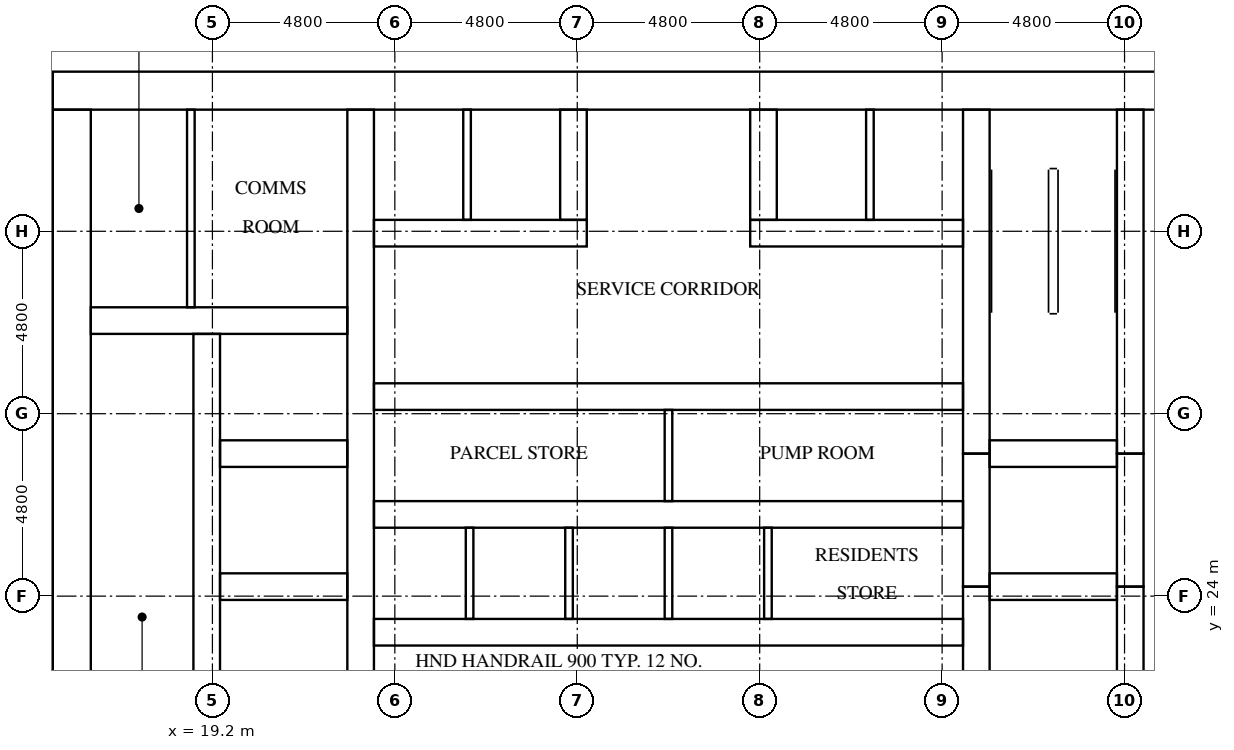
"""IFC4 building model, lengths in metres.
Left out: names, types, materials, properties, quantities, classifications, styles, units other than length and angle.
Written with IfcOpenShell. Run it as: python <this file> out.ifc"""

import sys

from ifc_helpers import new_model, si_unit, direction, frame, frame_2d, origin, place, context, subcontext, project, spatial, rectangle, extrude, element, fill, save


model = new_model("IFC4")
c1 = context("Model", 3, precision=1e-05, world=origin(), true_north=direction((0.0, 1.0)))
c2 = subcontext(c1, "Body", "Model", "MODEL_VIEW")
j1 = project(units=[si_unit("LENGTHUNIT", "METRE"), si_unit("PLANEANGLEUNIT", "RADIAN")], contexts=[c1])
p1 = place(None, origin())
s1 = spatial("IfcSite", under=j1, at=p1, CompositionType="ELEMENT")
p2 = place(p1, origin())
s2 = spatial("IfcBuilding", under=s1, at=p2, CompositionType="ELEMENT")
p3 = place(p2, frame((0.0, 0.0, 15.0)))
s3 = spatial("IfcBuildingStorey", under=s2, at=p3, CompositionType="ELEMENT", Elevation=15.0)
p4 = place(p3, frame((15.0, 37.3, 0.0), z_axis=(0.0, 0.0, 1.0), x_axis=(1.0, 0.0, 0.0)))
e1 = element("IfcWall", 1, at=p4, inside=s3, PredefinedType="SHEAR", context=c2, shape_type="SweptSolid", body=[
    extrude(rectangle(XDim=32.4, YDim=1.0, at=frame_2d((16.2, 0.0))), origin(), (0.0, 0.0, 1.0), 4.2),
])
p5 = place(p4, frame((15.3, 0.0, 0.0)))
e2 = element("IfcOpeningElement", 2, at=p5, cuts=e1, PredefinedType="OPENING", context=c2, shape_type="SweptSolid", body=[
    extrude(rectangle(XDim=1.8, YDim=2.1, at=frame_2d((0.9, 1.05))), frame((0.0, 0.51, 0.0), z_axis=(0.0, -1.0, 0.0), x_axis=(1.0, 0.0, 0.0)), (0.0, 0.0, 1.0), 1.02),
])
p6 = place(p4, frame((1.766, 0.0, 0.0)))
e3 = element("IfcOpeningElement", 3, at=p6, cuts=e1, PredefinedType="OPENING", context=c2, shape_type="SweptSolid", body=[
    extrude(rectangle(XDim=1.0, YDim=2.1, at=frame_2d((0.5, 1.05))), frame((0.0, 0.51, 0.0), z_axis=(0.0, -1.0, 0.0), x_axis=(1.0, 0.0, 0.0)), (0.0, 0.0, 1.0), 1.02),
])
p7 = place(p4, frame((5.241, 0.0, 0.0)))
e4 = element("IfcOpeningElement", 4, at=p7, cuts=e1, PredefinedType="OPENING", context=c2, shape_type="SweptSolid", body=[
    extrude(rectangle(XDim=1.0, YDim=2.1, at=frame_2d((0.5, 1.05))), frame((0.0, 0.51, 0.0), z_axis=(0.0, -1.0, 0.0), x_axis=(1.0, 0.0, 0.0)), (0.0, 0.0, 1.0), 1.02),
])
p8 = place(p3, frame((15.5, 16.0, 0.0), z_axis=(0.0, 0.0, 1.0), x_axis=(0.0, 1.0, 0.0)))
e5 = element("IfcWall", 5, at=p8, inside=s3, PredefinedType="SHEAR", context=c2, shape_type="SweptSolid", body=[
    extrude(rectangle(XDim=20.8, YDim=1.0, at=frame_2d((10.4, 0.0))), origin(), (0.0, 0.0, 1.0), 4.2),
])
p9 = place(p8, frame((4.76, 0.0, 0.0)))
e6 = element("IfcOpeningElement", 6, at=p9, cuts=e5, PredefinedType="OPENING", context=c2, shape_type="SweptSolid", body=[
    extrude(rectangle(XDim=1.2, YDim=2.1, at=frame_2d((0.6, 1.05))), frame((0.0, 0.51, 0.0), z_axis=(0.0, -1.0, 0.0), x_axis=(1.0, 0.0, 0.0)), (0.0, 0.0, 1.0), 1.02),
])
p10 = place(p3, frame((19.05, 16.0, 0.0), z_axis=(0.0, 0.0, 1.0), x_axis=(0.0, 1.0, 0.0)))
e7 = element("IfcWall", 7, at=p10, inside=s3, PredefinedType="SHEAR", context=c2, shape_type="SweptSolid", body=[
    extrude(rectangle(XDim=14.9, YDim=0.7, at=frame_2d((7.45, 0.0))), origin(), (0.0, 0.0, 1.0), 4.2),
])
p11 = place(p10, frame((9.45, 0.0, 0.0)))
e8 = element("IfcOpeningElement", 8, at=p11, cuts=e7, PredefinedType="OPENING", context=c2, shape_type="SweptSolid", body=[
    extrude(rectangle(XDim=1.1, YDim=2.1, at=frame_2d((0.55, 1.05))), frame((0.0, 0.36, 0.0), z_axis=(0.0, -1.0, 0.0), x_axis=(1.0, 0.0, 0.0)), (0.0, 0.0, 1.0), 0.72),
])
p12 = place(p10, frame((12.95, 0.0, 0.0)))
e9 = element("IfcOpeningElement", 9, at=p12, cuts=e7, PredefinedType="OPENING", context=c2, shape_type="SweptSolid", body=[
    extrude(rectangle(XDim=1.1, YDim=2.1, at=frame_2d((0.55, 1.05))), frame((0.0, 0.36, 0.0), z_axis=(0.0, -1.0, 0.0), x_axis=(1.0, 0.0, 0.0)), (0.0, 0.0, 1.0), 0.72),
])
p13 = place(p10, frame((0.2, 0.0, 0.0)))
e10 = element("IfcOpeningElement", 10, at=p13, cuts=e7, PredefinedType="OPENING", context=c2, shape_type="SweptSolid", body=[
    extrude(rectangle(XDim=1.2, YDim=2.1, at=frame_2d((0.6, 1.05))), frame((0.0, 0.36, 0.0), z_axis=(0.0, -1.0, 0.0), x_axis=(1.0, 0.0, 0.0)), (0.0, 0.0, 1.0), 0.72),
])
p14 = place(p3, frame((23.1, 16.0, 0.0), z_axis=(0.0, 0.0, 1.0), x_axis=(0.0, 1.0, 0.0)))
e11 = element("IfcWall", 11, at=p14, inside=s3, PredefinedType="SHEAR", context=c2, shape_type="SweptSolid", body=[
    extrude(rectangle(XDim=20.8, YDim=0.7, at=frame_2d((10.4, 0.0))), origin(), (0.0, 0.0, 1.0), 4.2),
])
p15 = place(p3, frame((39.3, 16.0, 0.0), z_axis=(0.0, 0.0, 1.0), x_axis=(0.0, 1.0, 0.0)))
e12 = element("IfcWall", 12, at=p15, inside=s3, PredefinedType="SHEAR", context=c2, shape_type="SweptSolid", body=[
    extrude(rectangle(XDim=8.25, YDim=0.7, at=frame_2d((4.125, 0.0))), origin(), (0.0, 0.0, 1.0), 4.2),
])
p16 = place(p3, frame((39.3, 24.25, 0.0), z_axis=(0.0, 0.0, 1.0), x_axis=(0.0, 1.0, 0.0)))
e13 = element("IfcWall", 13, at=p16, inside=s3, PredefinedType="SHEAR", context=c2, shape_type="SweptSolid", body=[
    extrude(rectangle(XDim=3.5, YDim=0.7, at=frame_2d((1.75, 0.0))), origin(), (0.0, 0.0, 1.0), 4.2),
])
p17 = place(p3, frame((39.3, 27.75, 0.0), z_axis=(0.0, 0.0, 1.0), x_axis=(0.0, 1.0, 0.0)))
e14 = element("IfcWall", 14, at=p17, inside=s3, PredefinedType="SHEAR", context=c2, shape_type="SweptSolid", body=[
    extrude(rectangle(XDim=9.05, YDim=0.7, at=frame_2d((4.525, 0.0))), origin(), (0.0, 0.0, 1.0), 4.2),
])
p18 = place(p3, frame((43.35, 16.0, 0.0), z_axis=(0.0, 0.0, 1.0), x_axis=(0.0, 1.0, 0.0)))
e15 = element("IfcWall", 15, at=p18, inside=s3, PredefinedType="SHEAR", context=c2, shape_type="SweptSolid", body=[
    extrude(rectangle(XDim=8.25, YDim=0.7, at=frame_2d((4.125, 0.0))), origin(), (0.0, 0.0, 1.0), 4.2),
])
p19 = place(p18, frame((0.2, 0.0, 0.0)))
e16 = element("IfcOpeningElement", 16, at=p19, cuts=e15, PredefinedType="OPENING", context=c2, shape_type="SweptSolid", body=[
    extrude(rectangle(XDim=1.2, YDim=2.1, at=frame_2d((0.6, 1.05))), frame((0.0, 0.36, 0.0), z_axis=(0.0, -1.0, 0.0), x_axis=(1.0, 0.0, 0.0)), (0.0, 0.0, 1.0), 0.72),
])
p20 = place(p3, frame((43.35, 24.25, 0.0), z_axis=(0.0, 0.0, 1.0), x_axis=(0.0, 1.0, 0.0)))
e17 = element("IfcWall", 17, at=p20, inside=s3, PredefinedType="SHEAR", context=c2, shape_type="SweptSolid", body=[
    extrude(rectangle(XDim=3.5, YDim=0.7, at=frame_2d((1.75, 0.0))), origin(), (0.0, 0.0, 1.0), 4.2),
])
p21 = place(p20, frame((1.2, 0.0, 0.0)))
e18 = element("IfcOpeningElement", 18, at=p21, cuts=e17, PredefinedType="OPENING", context=c2, shape_type="SweptSolid", body=[
    extrude(rectangle(XDim=1.1, YDim=2.1, at=frame_2d((0.55, 1.05))), frame((0.0, 0.36, 0.0), z_axis=(0.0, -1.0, 0.0), x_axis=(1.0, 0.0, 0.0)), (0.0, 0.0, 1.0), 0.72),
])
p22 = place(p3, frame((43.35, 27.75, 0.0), z_axis=(0.0, 0.0, 1.0), x_axis=(0.0, 1.0, 0.0)))
e19 = element("IfcWall", 19, at=p22, inside=s3, PredefinedType="SHEAR", context=c2, shape_type="SweptSolid", body=[
    extrude(rectangle(XDim=9.05, YDim=0.7, at=frame_2d((4.525, 0.0))), origin(), (0.0, 0.0, 1.0), 4.2),
])
p23 = place(p22, frame((7.65, 0.0, 0.0)))
e20 = element("IfcOpeningElement", 20, at=p23, cuts=e19, PredefinedType="OPENING", context=c2, shape_type="SweptSolid", body=[
    extrude(rectangle(XDim=1.2, YDim=2.1, at=frame_2d((0.6, 1.05))), frame((0.0, 0.36, 0.0), z_axis=(0.0, -1.0, 0.0), x_axis=(1.0, 0.0, 0.0)), (0.0, 0.0, 1.0), 0.72),
])
for number, where, z_axis, x_axis in (
    (21, (19.4, 24.25, 0.0), (0.0, 0.0, 1.0), (1.0, 0.0, 0.0)),
    (22, (19.4, 27.75, 0.0), (0.0, 0.0, 1.0), (1.0, 0.0, 0.0)),
):
    element("IfcWall", number, at=place(p3, frame(where, z_axis=z_axis, x_axis=x_axis)), inside=s3, PredefinedType="SHEAR", context=c2, shape_type="SweptSolid", body=[
        extrude(rectangle(XDim=3.35, YDim=0.7, at=frame_2d((1.675, 0.0))), origin(), (0.0, 0.0, 1.0), 4.2),
    ])
p24 = place(p3, frame((16.0, 31.25, 0.0), z_axis=(0.0, 0.0, 1.0), x_axis=(1.0, 0.0, 0.0)))
e23 = element("IfcWall", 23, at=p24, inside=s3, PredefinedType="SHEAR", context=c2, shape_type="SweptSolid", body=[
    extrude(rectangle(XDim=6.75, YDim=0.7, at=frame_2d((3.375, 0.0))), origin(), (0.0, 0.0, 1.0), 4.2),
])
for number, where, z_axis, x_axis in (
    (24, (39.65, 24.25, 0.0), (0.0, 0.0, 1.0), (1.0, 0.0, 0.0)),
    (25, (39.65, 27.75, 0.0), (0.0, 0.0, 1.0), (1.0, 0.0, 0.0)),
):
    element("IfcWall", number, at=place(p3, frame(where, z_axis=z_axis, x_axis=x_axis)), inside=s3, PredefinedType="SHEAR", context=c2, shape_type="SweptSolid", body=[
        extrude(rectangle(XDim=3.35, YDim=0.7, at=frame_2d((1.675, 0.0))), origin(), (0.0, 0.0, 1.0), 4.2),
    ])
p25 = place(p3, frame((23.45, 23.05, 0.0), z_axis=(0.0, 0.0, 1.0), x_axis=(1.0, 0.0, 0.0)))
e26 = element("IfcWall", 26, at=p25, inside=s3, PredefinedType="SHEAR", context=c2, shape_type="SweptSolid", body=[
    extrude(rectangle(XDim=15.5, YDim=0.7, at=frame_2d((7.75, 0.0))), origin(), (0.0, 0.0, 1.0), 4.2),
])
p26 = place(p25, frame((0.658, 0.0, 0.0)))
e27 = element("IfcOpeningElement", 27, at=p26, cuts=e26, PredefinedType="OPENING", context=c2, shape_type="SweptSolid", body=[
    extrude(rectangle(XDim=1.1, YDim=2.1, at=frame_2d((0.55, 1.05))), frame((0.0, 0.36, 0.0), z_axis=(0.0, -1.0, 0.0), x_axis=(1.0, 0.0, 0.0)), (0.0, 0.0, 1.0), 0.72),
])
p27 = place(p25, frame((3.275, 0.0, 0.0)))
e28 = element("IfcOpeningElement", 28, at=p27, cuts=e26, PredefinedType="OPENING", context=c2, shape_type="SweptSolid", body=[
    extrude(rectangle(XDim=1.1, YDim=2.1, at=frame_2d((0.55, 1.05))), frame((0.0, 0.36, 0.0), z_axis=(0.0, -1.0, 0.0), x_axis=(1.0, 0.0, 0.0)), (0.0, 0.0, 1.0), 0.72),
])
p28 = place(p25, frame((12.483, 0.0, 0.0)))
e29 = element("IfcOpeningElement", 29, at=p28, cuts=e26, PredefinedType="OPENING", context=c2, shape_type="SweptSolid", body=[
    extrude(rectangle(XDim=1.0, YDim=2.1, at=frame_2d((0.5, 1.05))), frame((0.0, 0.36, 0.0), z_axis=(0.0, -1.0, 0.0), x_axis=(1.0, 0.0, 0.0)), (0.0, 0.0, 1.0), 0.72),
])
p29 = place(p3, frame((23.45, 26.15, 0.0), z_axis=(0.0, 0.0, 1.0), x_axis=(1.0, 0.0, 0.0)))
e30 = element("IfcWall", 30, at=p29, inside=s3, PredefinedType="SHEAR", context=c2, shape_type="SweptSolid", body=[
    extrude(rectangle(XDim=15.5, YDim=0.7, at=frame_2d((7.75, 0.0))), origin(), (0.0, 0.0, 1.0), 4.2),
])
p30 = place(p3, frame((23.45, 29.25, 0.0), z_axis=(0.0, 0.0, 1.0), x_axis=(1.0, 0.0, 0.0)))
e31 = element("IfcWall", 31, at=p30, inside=s3, PredefinedType="SHEAR", context=c2, shape_type="SweptSolid", body=[
    extrude(rectangle(XDim=15.5, YDim=0.7, at=frame_2d((7.75, 0.0))), origin(), (0.0, 0.0, 1.0), 4.2),
])
p31 = place(p30, frame((3.325, 0.0, 0.0)))
e32 = element("IfcOpeningElement", 32, at=p31, cuts=e31, PredefinedType="OPENING", context=c2, shape_type="SweptSolid", body=[
    extrude(rectangle(XDim=1.0, YDim=2.1, at=frame_2d((0.5, 1.05))), frame((0.0, 0.36, 0.0), z_axis=(0.0, -1.0, 0.0), x_axis=(1.0, 0.0, 0.0)), (0.0, 0.0, 1.0), 0.72),
])
p32 = place(p30, frame((11.175, 0.0, 0.0)))
e33 = element("IfcOpeningElement", 33, at=p32, cuts=e31, PredefinedType="OPENING", context=c2, shape_type="SweptSolid", body=[
    extrude(rectangle(XDim=1.0, YDim=2.1, at=frame_2d((0.5, 1.05))), frame((0.0, 0.36, 0.0), z_axis=(0.0, -1.0, 0.0), x_axis=(1.0, 0.0, 0.0)), (0.0, 0.0, 1.0), 0.72),
])
p33 = place(p3, frame((23.45, 33.55, 0.0), z_axis=(0.0, 0.0, 1.0), x_axis=(1.0, 0.0, 0.0)))
e34 = element("IfcWall", 34, at=p33, inside=s3, PredefinedType="SHEAR", context=c2, shape_type="SweptSolid", body=[
    extrude(rectangle(XDim=5.6, YDim=0.7, at=frame_2d((2.8, 0.0))), origin(), (0.0, 0.0, 1.0), 4.2),
])
p34 = place(p3, frame((33.35, 33.55, 0.0), z_axis=(0.0, 0.0, 1.0), x_axis=(1.0, 0.0, 0.0)))
e35 = element("IfcWall", 35, at=p34, inside=s3, PredefinedType="SHEAR", context=c2, shape_type="SweptSolid", body=[
    extrude(rectangle(XDim=5.6, YDim=0.7, at=frame_2d((2.8, 0.0))), origin(), (0.0, 0.0, 1.0), 4.2),
])
for number, where, z_axis, x_axis in (
    (36, (28.7, 33.9, 0.0), (0.0, 0.0, 1.0), (0.0, 1.0, 0.0)),
    (37, (33.7, 33.9, 0.0), (0.0, 0.0, 1.0), (0.0, 1.0, 0.0)),
):
    element("IfcWall", number, at=place(p3, frame(where, z_axis=z_axis, x_axis=x_axis)), inside=s3, PredefinedType="SHEAR", context=c2, shape_type="SweptSolid", body=[
        extrude(rectangle(XDim=2.9, YDim=0.7, at=frame_2d((1.45, 0.0))), origin(), (0.0, 0.0, 1.0), 4.2),
    ])
for number, where, z_axis, x_axis in (
    (38, (25.967, 23.4, 0.0), (0.0, 0.0, 1.0), (0.0, 1.0, 0.0)),
    (39, (28.583, 23.4, 0.0), (0.0, 0.0, 1.0), (0.0, 1.0, 0.0)),
    (40, (31.2, 23.4, 0.0), (0.0, 0.0, 1.0), (0.0, 1.0, 0.0)),
    (41, (33.817, 23.4, 0.0), (0.0, 0.0, 1.0), (0.0, 1.0, 0.0)),
):
    element("IfcWall", number, at=place(p3, frame(where, z_axis=z_axis, x_axis=x_axis)), inside=s3, PredefinedType="SOLIDWALL", context=c2, shape_type="SweptSolid", body=[
        extrude(rectangle(XDim=2.4, YDim=0.2, at=frame_2d((1.2, 0.0))), origin(), (0.0, 0.0, 1.0), 4.2),
    ])
for number, where, z_axis, x_axis in (
    (42, (25.9, 33.9, 0.0), (0.0, 0.0, 1.0), (0.0, 1.0, 0.0)),
    (43, (36.5, 33.9, 0.0), (0.0, 0.0, 1.0), (0.0, 1.0, 0.0)),
):
    element("IfcWall", number, at=place(p3, frame(where, z_axis=z_axis, x_axis=x_axis)), inside=s3, PredefinedType="SOLIDWALL", context=c2, shape_type="SweptSolid", body=[
        extrude(rectangle(XDim=2.9, YDim=0.2, at=frame_2d((1.45, 0.0))), origin(), (0.0, 0.0, 1.0), 4.2),
    ])
p35 = place(p3, frame((18.633, 31.6, 0.0), z_axis=(0.0, 0.0, 1.0), x_axis=(0.0, 1.0, 0.0)))
e44 = element("IfcWall", 44, at=p35, inside=s3, PredefinedType="PARTITIONING", context=c2, shape_type="SweptSolid", body=[
    extrude(rectangle(XDim=5.2, YDim=0.2, at=frame_2d((2.6, 0.0))), origin(), (0.0, 0.0, 1.0), 4.2),
])
p36 = place(p3, frame((31.2, 26.5, 0.0), z_axis=(0.0, 0.0, 1.0), x_axis=(0.0, 1.0, 0.0)))
e45 = element("IfcWall", 45, at=p36, inside=s3, PredefinedType="PARTITIONING", context=c2, shape_type="SweptSolid", body=[
    extrude(rectangle(XDim=2.4, YDim=0.2, at=frame_2d((1.2, 0.0))), origin(), (0.0, 0.0, 1.0), 4.2),
])
p37 = place(p26, origin())
e46 = element("IfcDoor", 46, at=p37, inside=s3, OperationType="DOUBLE_DOOR_SLIDING", PredefinedType="DOOR", context=c2, shape_type="SweptSolid", body=[
    extrude(rectangle(XDim=1.1, YDim=2.1, at=frame_2d((0.55, 1.05))), frame((0.0, 0.025, 0.0), z_axis=(0.0, -1.0, 0.0), x_axis=(1.0, 0.0, 0.0)), (0.0, 0.0, 1.0), 0.05),
])
fill(e27, e46)
p38 = place(p27, origin())
e47 = element("IfcDoor", 47, at=p38, inside=s3, OperationType="DOUBLE_DOOR_SLIDING", PredefinedType="DOOR", context=c2, shape_type="SweptSolid", body=[
    extrude(rectangle(XDim=1.1, YDim=2.1, at=frame_2d((0.55, 1.05))), frame((0.0, 0.025, 0.0), z_axis=(0.0, -1.0, 0.0), x_axis=(1.0, 0.0, 0.0)), (0.0, 0.0, 1.0), 0.05),
])
fill(e28, e47)
p39 = place(p11, origin())
e48 = element("IfcDoor", 48, at=p39, inside=s3, OperationType="DOUBLE_DOOR_SLIDING", PredefinedType="DOOR", context=c2, shape_type="SweptSolid", body=[
    extrude(rectangle(XDim=1.1, YDim=2.1, at=frame_2d((0.55, 1.05))), frame((0.0, 0.025, 0.0), z_axis=(0.0, -1.0, 0.0), x_axis=(1.0, 0.0, 0.0)), (0.0, 0.0, 1.0), 0.05),
])
fill(e8, e48)
p40 = place(p12, origin())
e49 = element("IfcDoor", 49, at=p40, inside=s3, OperationType="DOUBLE_DOOR_SLIDING", PredefinedType="DOOR", context=c2, shape_type="SweptSolid", body=[
    extrude(rectangle(XDim=1.1, YDim=2.1, at=frame_2d((0.55, 1.05))), frame((0.0, 0.025, 0.0), z_axis=(0.0, -1.0, 0.0), x_axis=(1.0, 0.0, 0.0)), (0.0, 0.0, 1.0), 0.05),
])
fill(e9, e49)
p41 = place(p21, origin())
e50 = element("IfcDoor", 50, at=p41, inside=s3, OperationType="DOUBLE_DOOR_SLIDING", PredefinedType="DOOR", context=c2, shape_type="SweptSolid", body=[
    extrude(rectangle(XDim=1.1, YDim=2.1, at=frame_2d((0.55, 1.05))), frame((0.0, 0.025, 0.0), z_axis=(0.0, -1.0, 0.0), x_axis=(1.0, 0.0, 0.0)), (0.0, 0.0, 1.0), 0.05),
])
fill(e18, e50)
p42 = place(p23, origin())
e51 = element("IfcDoor", 51, at=p42, inside=s3, OperationType="SINGLE_SWING_LEFT", PredefinedType="DOOR", context=c2, shape_type="SweptSolid", body=[
    extrude(rectangle(XDim=1.2, YDim=2.1, at=frame_2d((0.6, 1.05))), frame((0.0, 0.025, 0.0), z_axis=(0.0, -1.0, 0.0), x_axis=(1.0, 0.0, 0.0)), (0.0, 0.0, 1.0), 0.05),
])
fill(e20, e51)
p43 = place(p5, origin())
e52 = element("IfcDoor", 52, at=p43, inside=s3, OperationType="DOUBLE_DOOR_SINGLE_SWING", PredefinedType="DOOR", context=c2, shape_type="SweptSolid", body=[
    extrude(rectangle(XDim=1.8, YDim=2.1, at=frame_2d((0.9, 1.05))), frame((0.0, 0.025, 0.0), z_axis=(0.0, -1.0, 0.0), x_axis=(1.0, 0.0, 0.0)), (0.0, 0.0, 1.0), 0.05),
])
fill(e2, e52)
p44 = place(p6, origin())
e53 = element("IfcDoor", 53, at=p44, inside=s3, OperationType="SINGLE_SWING_RIGHT", PredefinedType="DOOR", context=c2, shape_type="SweptSolid", body=[
    extrude(rectangle(XDim=1.0, YDim=2.1, at=frame_2d((0.5, 1.05))), frame((0.0, 0.025, 0.0), z_axis=(0.0, -1.0, 0.0), x_axis=(1.0, 0.0, 0.0)), (0.0, 0.0, 1.0), 0.05),
])
fill(e3, e53)
p45 = place(p7, origin())
e54 = element("IfcDoor", 54, at=p45, inside=s3, OperationType="SINGLE_SWING_LEFT", PredefinedType="DOOR", context=c2, shape_type="SweptSolid", body=[
    extrude(rectangle(XDim=1.0, YDim=2.1, at=frame_2d((0.5, 1.05))), frame((0.0, 0.025, 0.0), z_axis=(0.0, -1.0, 0.0), x_axis=(1.0, 0.0, 0.0)), (0.0, 0.0, 1.0), 0.05),
])
fill(e4, e54)
p46 = place(p28, frame((1.0, 0.0, 0.0), z_axis=(0.0, 0.0, 1.0), x_axis=(-1.0, 0.0, 0.0)))
e55 = element("IfcDoor", 55, at=p46, inside=s3, OperationType="SINGLE_SWING_RIGHT", PredefinedType="DOOR", context=c2, shape_type="SweptSolid", body=[
    extrude(rectangle(XDim=1.0, YDim=2.1, at=frame_2d((0.5, 1.05))), frame((0.0, 0.025, 0.0), z_axis=(0.0, -1.0, 0.0), x_axis=(1.0, 0.0, 0.0)), (0.0, 0.0, 1.0), 0.05),
])
fill(e29, e55)
p47 = place(p31, origin())
e56 = element("IfcDoor", 56, at=p47, inside=s3, OperationType="SINGLE_SWING_LEFT", PredefinedType="DOOR", context=c2, shape_type="SweptSolid", body=[
    extrude(rectangle(XDim=1.0, YDim=2.1, at=frame_2d((0.5, 1.05))), frame((0.0, 0.025, 0.0), z_axis=(0.0, -1.0, 0.0), x_axis=(1.0, 0.0, 0.0)), (0.0, 0.0, 1.0), 0.05),
])
fill(e32, e56)
p48 = place(p32, origin())
e57 = element("IfcDoor", 57, at=p48, inside=s3, OperationType="SINGLE_SWING_RIGHT", PredefinedType="DOOR", context=c2, shape_type="SweptSolid", body=[
    extrude(rectangle(XDim=1.0, YDim=2.1, at=frame_2d((0.5, 1.05))), frame((0.0, 0.025, 0.0), z_axis=(0.0, -1.0, 0.0), x_axis=(1.0, 0.0, 0.0)), (0.0, 0.0, 1.0), 0.05),
])
fill(e33, e57)
save(model, sys.argv[1])
